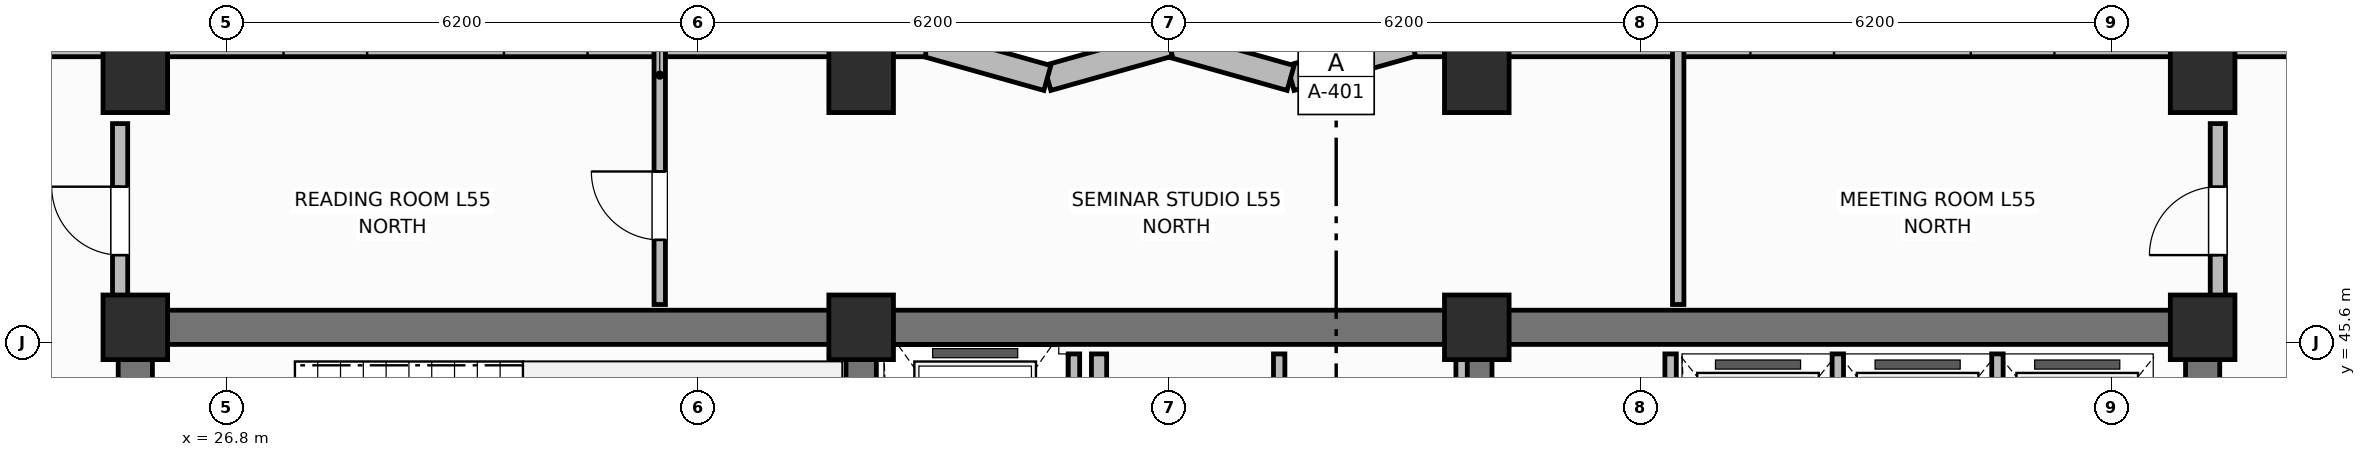
"""IFC4 building model, lengths in metres.
Left out: names, types, materials, properties, quantities, classifications, styles, units other than length and angle.
Written with IfcOpenShell. Run it as: python <this file> out.ifc"""

import sys

from ifc_helpers import new_model, si_unit, direction, frame, frame_2d, origin, origin_2d, place, context, subcontext, project, spatial, rectangle, extrude, element, fill, save


model = new_model("IFC4")
c1 = context("Model", 3, precision=1e-05, world=origin(), true_north=direction((0.0, 1.0)))
c2 = subcontext(c1, "Body", "Model", "MODEL_VIEW")
j1 = project(units=[si_unit("LENGTHUNIT", "METRE"), si_unit("PLANEANGLEUNIT", "RADIAN")], contexts=[c1])
p1 = place(None, origin())
s1 = spatial("IfcSite", under=j1, at=p1, CompositionType="ELEMENT")
p2 = place(p1, origin())
s2 = spatial("IfcBuilding", under=s1, at=p2, CompositionType="ELEMENT")
p3 = place(p2, frame((0.0, 0.0, 222.1)))
s3 = spatial("IfcBuildingStorey", under=s2, at=p3, CompositionType="ELEMENT", Elevation=222.1)
p4 = place(p3, frame((25.6, 45.8, 0.0), z_axis=(0.0, 0.0, 1.0), x_axis=(1.0, 0.0, 0.0)))
e1 = element("IfcWall", 1, at=p4, inside=s3, PredefinedType="SHEAR", context=c2, shape_type="SweptSolid", body=[
    extrude(rectangle(XDim=27.2, YDim=0.45, at=frame_2d((13.6, 0.0))), origin(), (0.0, 0.0, 1.0), 3.7),
])
for number, where, z_axis, x_axis in (
    (2, (25.6, 39.825, 0.0), (0.0, 0.0, 1.0), (0.0, 1.0, 0.0)),
    (3, (52.8, 39.825, 0.0), (0.0, 0.0, 1.0), (0.0, 1.0, 0.0)),
):
    element("IfcWall", number, at=place(p3, frame(where, z_axis=z_axis, x_axis=x_axis)), inside=s3, PredefinedType="SHEAR", context=c2, shape_type="SweptSolid", body=[
        extrude(rectangle(XDim=5.75, YDim=0.45, at=frame_2d((2.875, 0.0))), origin(), (0.0, 0.0, 1.0), 3.7),
    ])
for number, where, z_axis, x_axis in (
    (4, (35.15, 39.825, 0.0), (0.0, 0.0, 1.0), (0.0, 1.0, 0.0)),
    (5, (43.25, 39.825, 0.0), (0.0, 0.0, 1.0), (0.0, 1.0, 0.0)),
):
    element("IfcWall", number, at=place(p3, frame(where, z_axis=z_axis, x_axis=x_axis)), inside=s3, PredefinedType="SHEAR", context=c2, shape_type="SweptSolid", body=[
        extrude(rectangle(XDim=5.75, YDim=0.4, at=frame_2d((2.875, 0.0))), origin(), (0.0, 0.0, 1.0), 3.7),
    ])
for number, where, z_axis, x_axis in (
    (6, (25.6, 45.8, 0.0), (0.0, 0.0, 1.0), (1.0, 0.0, 0.0)),
    (7, (35.15, 45.8, 0.0), (0.0, 0.0, 1.0), (1.0, 0.0, 0.0)),
    (8, (43.25, 45.8, 0.0), (0.0, 0.0, 1.0), (1.0, 0.0, 0.0)),
    (9, (52.8, 45.8, 0.0), (0.0, 0.0, 1.0), (1.0, 0.0, 0.0)),
    (10, (25.6, 49.05, 0.0), (0.0, 0.0, 1.0), (1.0, 0.0, 0.0)),
    (11, (35.15, 49.05, 0.0), (0.0, 0.0, 1.0), (1.0, 0.0, 0.0)),
    (12, (43.25, 49.05, 0.0), (0.0, 0.0, 1.0), (1.0, 0.0, 0.0)),
    (13, (52.8, 49.05, 0.0), (0.0, 0.0, 1.0), (1.0, 0.0, 0.0)),
):
    element("IfcColumn", number, at=place(p3, frame(where, z_axis=z_axis, x_axis=x_axis)), inside=s3, PredefinedType="COLUMN", context=c2, shape_type="SweptSolid", body=[
        extrude(rectangle(XDim=0.85, YDim=0.85, at=origin_2d()), origin(), (0.0, 0.0, 1.0), 3.7),
    ])
p5 = place(p3, frame((58.2, 49.53, 0.0), z_axis=(0.0, 0.0, 1.0), x_axis=(-1.0, 0.0, 0.0)))
e14 = element("IfcWall", 14, at=p5, inside=s3, PredefinedType="SOLIDWALL", context=c2, shape_type="SweptSolid", body=[
    extrude(rectangle(XDim=15.8, YDim=0.34, at=frame_2d((7.9, 0.0))), origin(), (0.0, 0.0, 1.0), 2.26),
])
p6 = place(p5, frame((1.55, 0.0, 0.49)))
e15 = element("IfcOpeningElement", 15, at=p6, cuts=e14, PredefinedType="OPENING", context=c2, shape_type="SweptSolid", body=[
    extrude(rectangle(XDim=1.1, YDim=1.65, at=frame_2d((0.55, 0.825))), frame((0.0, 0.18, 0.0), z_axis=(0.0, -1.0, 0.0), x_axis=(1.0, 0.0, 0.0)), (0.0, 0.0, 1.0), 0.36),
])
p7 = place(p5, frame((7.35, 0.0, 0.49)))
e16 = element("IfcOpeningElement", 16, at=p7, cuts=e14, PredefinedType="OPENING", context=c2, shape_type="SweptSolid", body=[
    extrude(rectangle(XDim=1.1, YDim=1.65, at=frame_2d((0.55, 0.825))), frame((0.0, 0.18, 0.0), z_axis=(0.0, -1.0, 0.0), x_axis=(1.0, 0.0, 0.0)), (0.0, 0.0, 1.0), 0.36),
])
p8 = place(p5, frame((10.25, 0.0, 0.49)))
e17 = element("IfcOpeningElement", 17, at=p8, cuts=e14, PredefinedType="OPENING", context=c2, shape_type="SweptSolid", body=[
    extrude(rectangle(XDim=1.1, YDim=1.65, at=frame_2d((0.55, 0.825))), frame((0.0, 0.18, 0.0), z_axis=(0.0, -1.0, 0.0), x_axis=(1.0, 0.0, 0.0)), (0.0, 0.0, 1.0), 0.36),
])
p9 = place(p3, frame((42.4, 49.53, 0.0), z_axis=(0.0, 0.0, 1.0), x_axis=(-0.962652136636, -0.270741322725, 0.0)))
e18 = element("IfcWall", 18, at=p9, inside=s3, PredefinedType="SOLIDWALL", context=c2, shape_type="SweptSolid", body=[
    extrude(rectangle(XDim=1.662, YDim=0.34, at=frame_2d((0.831, 0.0))), origin(), (0.0, 0.0, 1.0), 2.26),
])
p10 = place(p3, frame((40.8, 49.08, 0.0), z_axis=(0.0, 0.0, 1.0), x_axis=(-0.962662902433, 0.270703040766, 0.0)))
e19 = element("IfcWall", 19, at=p10, inside=s3, PredefinedType="SOLIDWALL", context=c2, shape_type="SweptSolid", body=[
    extrude(rectangle(XDim=1.662, YDim=0.34, at=frame_2d((0.831, 0.0))), origin(), (0.0, 0.0, 1.0), 2.26),
])
p11 = place(p3, frame((39.2, 49.53, 0.0), z_axis=(0.0, 0.0, 1.0), x_axis=(-0.962652136636, -0.270741322725, 0.0)))
e20 = element("IfcWall", 20, at=p11, inside=s3, PredefinedType="SOLIDWALL", context=c2, shape_type="SweptSolid", body=[
    extrude(rectangle(XDim=1.662, YDim=0.34, at=frame_2d((0.831, 0.0))), origin(), (0.0, 0.0, 1.0), 2.26),
])
p12 = place(p3, frame((37.6, 49.08, 0.0), z_axis=(0.0, 0.0, 1.0), x_axis=(-0.962662902433, 0.270703040766, 0.0)))
e21 = element("IfcWall", 21, at=p12, inside=s3, PredefinedType="SOLIDWALL", context=c2, shape_type="SweptSolid", body=[
    extrude(rectangle(XDim=1.662, YDim=0.34, at=frame_2d((0.831, 0.0))), origin(), (0.0, 0.0, 1.0), 2.26),
])
p13 = place(p3, frame((36.0, 49.53, 0.0), z_axis=(0.0, 0.0, 1.0), x_axis=(-1.0, 0.0, 0.0)))
e22 = element("IfcWall", 22, at=p13, inside=s3, PredefinedType="SOLIDWALL", context=c2, shape_type="SweptSolid", body=[
    extrude(rectangle(XDim=15.8, YDim=0.34, at=frame_2d((7.9, 0.0))), origin(), (0.0, 0.0, 1.0), 2.26),
])
p14 = place(p13, frame((4.45, 0.0, 0.49)))
e23 = element("IfcOpeningElement", 23, at=p14, cuts=e22, PredefinedType="OPENING", context=c2, shape_type="SweptSolid", body=[
    extrude(rectangle(XDim=1.1, YDim=1.65, at=frame_2d((0.55, 0.825))), frame((0.0, 0.18, 0.0), z_axis=(0.0, -1.0, 0.0), x_axis=(1.0, 0.0, 0.0)), (0.0, 0.0, 1.0), 0.36),
])
p15 = place(p13, frame((7.35, 0.0, 0.49)))
e24 = element("IfcOpeningElement", 24, at=p15, cuts=e22, PredefinedType="OPENING", context=c2, shape_type="SweptSolid", body=[
    extrude(rectangle(XDim=1.1, YDim=1.65, at=frame_2d((0.55, 0.825))), frame((0.0, 0.18, 0.0), z_axis=(0.0, -1.0, 0.0), x_axis=(1.0, 0.0, 0.0)), (0.0, 0.0, 1.0), 0.36),
])
p16 = place(p13, frame((13.85, 0.0, 0.49)))
e25 = element("IfcOpeningElement", 25, at=p16, cuts=e22, PredefinedType="OPENING", context=c2, shape_type="SweptSolid", body=[
    extrude(rectangle(XDim=1.1, YDim=1.65, at=frame_2d((0.55, 0.825))), frame((0.0, 0.18, 0.0), z_axis=(0.0, -1.0, 0.0), x_axis=(1.0, 0.0, 0.0)), (0.0, 0.0, 1.0), 0.36),
])
p17 = place(p3, frame((37.95, 42.6, 0.0), z_axis=(0.0, 0.0, 1.0), x_axis=(0.0, 1.0, 0.0)))
e26 = element("IfcWall", 26, at=p17, inside=s3, PredefinedType="PARTITIONING", context=c2, shape_type="SweptSolid", body=[
    extrude(rectangle(XDim=2.85, YDim=0.15, at=frame_2d((1.425, 0.0))), origin(), (0.0, 0.0, 1.0), 2.24),
])
p18 = place(p3, frame((38.28, 39.82, 0.0), z_axis=(0.0, 0.0, 1.0), x_axis=(0.0, 1.0, 0.0)))
e27 = element("IfcWall", 27, at=p18, inside=s3, PredefinedType="PARTITIONING", context=c2, shape_type="SweptSolid", body=[
    extrude(rectangle(XDim=5.63, YDim=0.2, at=frame_2d((2.815, 0.0))), origin(), (0.0, 0.0, 1.0), 2.24),
])
for number, where, z_axis, x_axis in (
    (28, (43.05, 39.82, 0.0), (0.0, 0.0, 1.0), (0.0, 1.0, 0.0)),
    (29, (40.65, 39.82, 0.0), (0.0, 0.0, 1.0), (0.0, 1.0, 0.0)),
    (30, (45.8, 39.82, 0.0), (0.0, 0.0, 1.0), (0.0, 1.0, 0.0)),
):
    element("IfcWall", number, at=place(p3, frame(where, z_axis=z_axis, x_axis=x_axis)), inside=s3, PredefinedType="PARTITIONING", context=c2, shape_type="SweptSolid", body=[
        extrude(rectangle(XDim=5.63, YDim=0.15, at=frame_2d((2.815, 0.0))), origin(), (0.0, 0.0, 1.0), 2.24),
    ])
for number, where, z_axis, x_axis in (
    (31, (48.0, 42.65, 0.0), (0.0, 0.0, 1.0), (0.0, 1.0, 0.0)),
    (32, (50.1, 42.65, 0.0), (0.0, 0.0, 1.0), (0.0, 1.0, 0.0)),
):
    element("IfcWall", number, at=place(p3, frame(where, z_axis=z_axis, x_axis=x_axis)), inside=s3, PredefinedType="PARTITIONING", context=c2, shape_type="SweptSolid", body=[
        extrude(rectangle(XDim=2.8, YDim=0.15, at=frame_2d((1.4, 0.0))), origin(), (0.0, 0.0, 1.0), 2.24),
    ])
p19 = place(p3, frame((32.5, 46.1, 0.0), z_axis=(0.0, 0.0, 1.0), x_axis=(0.0, 1.0, 0.0)))
e33 = element("IfcWall", 33, at=p19, inside=s3, PredefinedType="PARTITIONING", context=c2, shape_type="SweptSolid", body=[
    extrude(rectangle(XDim=3.43, YDim=0.15, at=frame_2d((1.715, 0.0))), origin(), (0.0, 0.0, 1.0), 2.24),
])
p20 = place(p19, frame((0.85, 0.0, 0.0)))
e34 = element("IfcOpeningElement", 34, at=p20, cuts=e33, PredefinedType="OPENING", context=c2, shape_type="SweptSolid", body=[
    extrude(rectangle(XDim=0.9, YDim=2.1, at=frame_2d((0.45, 1.05))), frame((0.0, 0.085, 0.0), z_axis=(0.0, -1.0, 0.0), x_axis=(1.0, 0.0, 0.0)), (0.0, 0.0, 1.0), 0.17),
])
p21 = place(p3, frame((45.9, 46.1, 0.0), z_axis=(0.0, 0.0, 1.0), x_axis=(0.0, 1.0, 0.0)))
e35 = element("IfcWall", 35, at=p21, inside=s3, PredefinedType="PARTITIONING", context=c2, shape_type="SweptSolid", body=[
    extrude(rectangle(XDim=3.43, YDim=0.15, at=frame_2d((1.715, 0.0))), origin(), (0.0, 0.0, 1.0), 2.24),
])
p22 = place(p3, frame((25.4, 46.1, 0.0), z_axis=(0.0, 0.0, 1.0), x_axis=(0.0, 1.0, 0.0)))
e36 = element("IfcWall", 36, at=p22, inside=s3, PredefinedType="PARTITIONING", context=c2, shape_type="SweptSolid", body=[
    extrude(rectangle(XDim=2.38, YDim=0.2, at=frame_2d((1.19, 0.0))), origin(), (0.0, 0.0, 1.0), 2.24),
])
p23 = place(p22, frame((0.65, 0.0, 0.0)))
e37 = element("IfcOpeningElement", 37, at=p23, cuts=e36, PredefinedType="OPENING", context=c2, shape_type="SweptSolid", body=[
    extrude(rectangle(XDim=0.9, YDim=2.1, at=frame_2d((0.45, 1.05))), frame((0.0, 0.11, 0.0), z_axis=(0.0, -1.0, 0.0), x_axis=(1.0, 0.0, 0.0)), (0.0, 0.0, 1.0), 0.22),
])
p24 = place(p3, frame((53.0, 46.1, 0.0), z_axis=(0.0, 0.0, 1.0), x_axis=(0.0, 1.0, 0.0)))
e38 = element("IfcWall", 38, at=p24, inside=s3, PredefinedType="PARTITIONING", context=c2, shape_type="SweptSolid", body=[
    extrude(rectangle(XDim=2.38, YDim=0.2, at=frame_2d((1.19, 0.0))), origin(), (0.0, 0.0, 1.0), 2.24),
])
p25 = place(p24, frame((0.65, 0.0, 0.0)))
e39 = element("IfcOpeningElement", 39, at=p25, cuts=e38, PredefinedType="OPENING", context=c2, shape_type="SweptSolid", body=[
    extrude(rectangle(XDim=0.9, YDim=2.1, at=frame_2d((0.45, 1.05))), frame((0.0, 0.11, 0.0), z_axis=(0.0, -1.0, 0.0), x_axis=(1.0, 0.0, 0.0)), (0.0, 0.0, 1.0), 0.22),
])
p26 = place(p20, origin())
e40 = element("IfcDoor", 40, at=p26, inside=s3, OperationType="SINGLE_SWING_RIGHT", PredefinedType="DOOR", context=c2, shape_type="SweptSolid", body=[
    extrude(rectangle(XDim=0.9, YDim=2.1, at=frame_2d((0.45, 1.05))), frame((0.0, 0.025, 0.0), z_axis=(0.0, -1.0, 0.0), x_axis=(1.0, 0.0, 0.0)), (0.0, 0.0, 1.0), 0.05),
])
fill(e34, e40)
p27 = place(p23, origin())
e41 = element("IfcDoor", 41, at=p27, inside=s3, OperationType="SINGLE_SWING_RIGHT", PredefinedType="DOOR", context=c2, shape_type="SweptSolid", body=[
    extrude(rectangle(XDim=0.9, YDim=2.1, at=frame_2d((0.45, 1.05))), frame((0.0, 0.025, 0.0), z_axis=(0.0, -1.0, 0.0), x_axis=(1.0, 0.0, 0.0)), (0.0, 0.0, 1.0), 0.05),
])
fill(e37, e41)
p28 = place(p25, origin())
e42 = element("IfcDoor", 42, at=p28, inside=s3, OperationType="SINGLE_SWING_LEFT", PredefinedType="DOOR", context=c2, shape_type="SweptSolid", body=[
    extrude(rectangle(XDim=0.9, YDim=2.1, at=frame_2d((0.45, 1.05))), frame((0.0, 0.025, 0.0), z_axis=(0.0, -1.0, 0.0), x_axis=(1.0, 0.0, 0.0)), (0.0, 0.0, 1.0), 0.05),
])
fill(e39, e42)
save(model, sys.argv[1])
